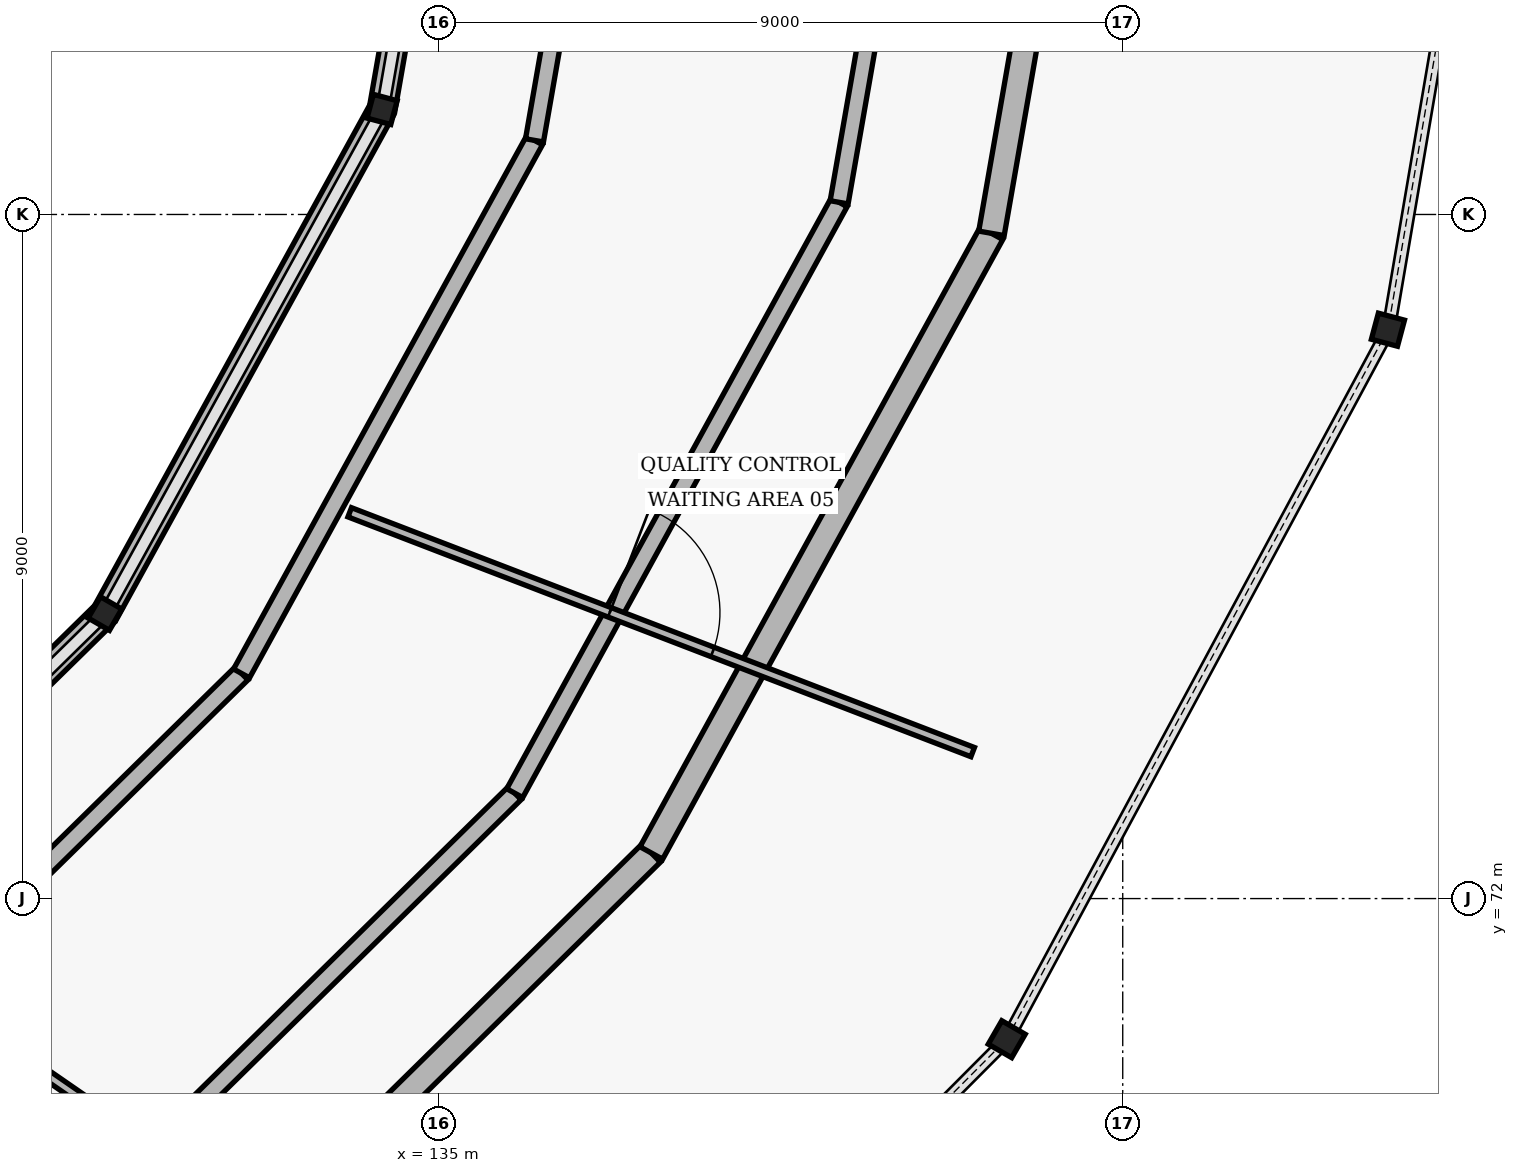
"""IFC4 building model, lengths in metres.
Left out: names, types, materials, properties, quantities, classifications, styles, units other than length and angle.
Written with IfcOpenShell. Run it as: python <this file> out.ifc"""

import sys

from ifc_helpers import new_model, si_unit, direction, frame, frame_2d, origin, origin_2d, place, context, subcontext, project, spatial, rectangle, hollow_circle, extrude, element, fill, save


model = new_model("IFC4")
c1 = context("Model", 3, precision=1e-05, world=origin(), true_north=direction((0.0, 1.0)))
c2 = subcontext(c1, "Body", "Model", "MODEL_VIEW")
j1 = project(units=[si_unit("LENGTHUNIT", "METRE"), si_unit("PLANEANGLEUNIT", "RADIAN")], contexts=[c1])
p1 = place(None, origin())
s1 = spatial("IfcSite", under=j1, at=p1, CompositionType="ELEMENT")
p2 = place(p1, origin())
s2 = spatial("IfcBuilding", under=s1, at=p2, CompositionType="ELEMENT")
p3 = place(p2, frame((0.0, 0.0, 9.6)))
s3 = spatial("IfcBuildingStorey", under=s2, at=p3, CompositionType="ELEMENT", Elevation=9.6)
p4 = place(p3, frame((130.61, 75.75, 0.0), z_axis=(0.0, 0.0, 1.0), x_axis=(0.866025403784, -0.5, 0.0)))
e1 = element("IfcColumn", 1, at=p4, inside=s3, PredefinedType="COLUMN", context=c2, shape_type="SweptSolid", body=[
    extrude(hollow_circle(Radius=0.162, WallThickness=0.016, at=origin_2d()), origin(), (0.0, 0.0, 1.0), 4.38),
])
p5 = place(p3, frame((142.474, 70.15, 0.0), z_axis=(0.0, 0.0, 1.0), x_axis=(0.866025403784, -0.5, 0.0)))
e2 = element("IfcColumn", 2, at=p5, inside=s3, PredefinedType="COLUMN", context=c2, shape_type="SweptSolid", body=[
    extrude(hollow_circle(Radius=0.178, WallThickness=0.016, at=origin_2d()), origin(), (0.0, 0.0, 1.0), 3.38),
])
p6 = place(p3, frame((134.256, 82.382, 0.0), z_axis=(0.0, 0.0, 1.0), x_axis=(0.965925826289, -0.258819045103, 0.0)))
e3 = element("IfcColumn", 3, at=p6, inside=s3, PredefinedType="COLUMN", context=c2, shape_type="SweptSolid", body=[
    extrude(hollow_circle(Radius=0.162, WallThickness=0.016, at=origin_2d()), origin(), (0.0, 0.0, 1.0), 4.38),
])
p7 = place(p3, frame((147.489, 79.484, 0.0), z_axis=(0.0, 0.0, 1.0), x_axis=(0.965925826289, -0.258819045103, 0.0)))
e4 = element("IfcColumn", 4, at=p7, inside=s3, PredefinedType="COLUMN", context=c2, shape_type="SweptSolid", body=[
    extrude(hollow_circle(Radius=0.178, WallThickness=0.016, at=origin_2d()), origin(), (0.0, 0.0, 1.0), 3.38),
])
p8 = place(p3, frame((130.678, 65.6, 4.53), z_axis=(0.0, 0.0, 1.0), x_axis=(0.713096204455, 0.701066190307, 0.0)))
e5 = element("IfcWall", 5, at=p8, inside=s3, PredefinedType="SOLIDWALL", context=c2, shape_type="SweptSolid", body=[
    extrude(rectangle(XDim=9.985, YDim=0.34, at=frame_2d((4.992, 0.0))), origin(), (0.0, 0.0, 1.0), 3.02),
])
p9 = place(p3, frame((124.809, 70.055, 4.39), z_axis=(0.0, 0.0, 1.0), x_axis=(0.713593723838, 0.700559774251, 0.0)))
e6 = element("IfcWall", 6, at=p9, inside=s3, PredefinedType="SOLIDWALL", context=c2, shape_type="SweptSolid", body=[
    extrude(rectangle(XDim=8.129, YDim=0.34, at=frame_2d((4.065, 0.0))), origin(), (0.0, 0.0, 1.0), 3.16),
])
p10 = place(p3, frame((129.211, 66.713, 7.58), z_axis=(0.0, 0.0, 1.0), x_axis=(0.713170660677, 0.700990448401, 0.0)))
e7 = element("IfcWall", 7, at=p10, inside=s3, PredefinedType="SOLIDWALL", context=c2, shape_type="SweptSolid", body=[
    extrude(rectangle(XDim=9.521, YDim=0.24, at=frame_2d((4.76, 0.0))), origin(), (0.0, 0.0, 1.0), 2.37),
])
p11 = place(p3, frame((126.277, 68.941, 7.58), z_axis=(0.0, 0.0, 1.0), x_axis=(0.713414677491, 0.700742105157, 0.0)))
e8 = element("IfcWall", 8, at=p11, inside=s3, PredefinedType="SOLIDWALL", context=c2, shape_type="SweptSolid", body=[
    extrude(rectangle(XDim=8.592, YDim=0.24, at=frame_2d((4.296, 0.0))), origin(), (0.0, 0.0, 1.0), 2.37),
])
p12 = place(p3, frame((137.798, 72.6, 4.53), z_axis=(0.0, 0.0, 1.0), x_axis=(0.481203038707, 0.876609169208, 0.0)))
e9 = element("IfcWall", 9, at=p12, inside=s3, PredefinedType="SOLIDWALL", context=c2, shape_type="SweptSolid", body=[
    extrude(rectangle(XDim=9.299, YDim=0.34, at=frame_2d((4.65, 0.0))), origin(), (0.0, 0.0, 1.0), 3.02),
])
p13 = place(p3, frame((130.61, 75.75, 4.39), z_axis=(0.0, 0.0, 1.0), x_axis=(0.481751565348, 0.876307839338, 0.0)))
e10 = element("IfcWall", 10, at=p13, inside=s3, PredefinedType="SOLIDWALL", context=c2, shape_type="SweptSolid", body=[
    extrude(rectangle(XDim=7.568, YDim=0.34, at=frame_2d((3.784, 0.0))), origin(), (0.0, 0.0, 1.0), 3.16),
])
p14 = place(p3, frame((136.001, 73.387, 7.58), z_axis=(0.0, 0.0, 1.0), x_axis=(0.48130775835, 0.876551676601, 0.0)))
e11 = element("IfcWall", 11, at=p14, inside=s3, PredefinedType="SOLIDWALL", context=c2, shape_type="SweptSolid", body=[
    extrude(rectangle(XDim=8.868, YDim=0.24, at=frame_2d((4.434, 0.0))), origin(), (0.0, 0.0, 1.0), 2.37),
])
p15 = place(p3, frame((132.407, 74.962, 7.58), z_axis=(0.0, 0.0, 1.0), x_axis=(0.481607192972, 0.876387192785, 0.0)))
e12 = element("IfcWall", 12, at=p15, inside=s3, PredefinedType="SOLIDWALL", context=c2, shape_type="SweptSolid", body=[
    extrude(rectangle(XDim=8.002, YDim=0.24, at=frame_2d((4.001, 0.0))), origin(), (0.0, 0.0, 1.0), 2.37),
])
p16 = place(p3, frame((142.273, 80.752, 4.53), z_axis=(0.0, 0.0, 1.0), x_axis=(0.171964181022, 0.985103202941, 0.0)))
e13 = element("IfcWall", 13, at=p16, inside=s3, PredefinedType="SOLIDWALL", context=c2, shape_type="SweptSolid", body=[
    extrude(rectangle(XDim=8.88, YDim=0.34, at=frame_2d((4.44, 0.0))), origin(), (0.0, 0.0, 1.0), 3.02),
])
p17 = place(p3, frame((134.256, 82.382, 4.39), z_axis=(0.0, 0.0, 1.0), x_axis=(0.172146745201, 0.985071316259, 0.0)))
e14 = element("IfcWall", 14, at=p17, inside=s3, PredefinedType="SOLIDWALL", context=c2, shape_type="SweptSolid", body=[
    extrude(rectangle(XDim=7.226, YDim=0.34, at=frame_2d((3.613, 0.0))), origin(), (0.0, 0.0, 1.0), 3.16),
])
p18 = place(p3, frame((140.269, 81.16, 7.58), z_axis=(0.0, 0.0, 1.0), x_axis=(0.171983700119, 0.985099795398, 0.0)))
e15 = element("IfcWall", 15, at=p18, inside=s3, PredefinedType="SOLIDWALL", context=c2, shape_type="SweptSolid", body=[
    extrude(rectangle(XDim=8.466, YDim=0.24, at=frame_2d((4.233, 0.0))), origin(), (0.0, 0.0, 1.0), 2.37),
])
p19 = place(p3, frame((136.261, 81.975, 7.58), z_axis=(0.0, 0.0, 1.0), x_axis=(0.172012838792, 0.985094707777, 0.0)))
e16 = element("IfcWall", 16, at=p19, inside=s3, PredefinedType="SOLIDWALL", context=c2, shape_type="SweptSolid", body=[
    extrude(rectangle(XDim=7.639, YDim=0.24, at=frame_2d((3.819, 0.0))), origin(), (0.0, 0.0, 1.0), 2.37),
])
p20 = place(p3, frame((128.475, 70.626, 0.0), z_axis=(0.0, 0.0, 1.0), x_axis=(0.822666462931, -0.568524309743, 0.0)))
e17 = element("IfcWall", 17, at=p20, inside=s3, PredefinedType="PARTITIONING", context=c2, shape_type="SweptSolid", body=[
    extrude(rectangle(XDim=8.223, YDim=0.13, at=frame_2d((4.112, 0.0))), origin(), (0.0, 0.0, 1.0), 2.9),
])
p21 = place(p20, frame((3.387, 0.0, 0.0)))
e18 = element("IfcOpeningElement", 18, at=p21, cuts=e17, PredefinedType="OPENING", context=c2, shape_type="SweptSolid", body=[
    extrude(rectangle(XDim=1.45, YDim=2.15, at=frame_2d((0.725, 1.075))), frame((0.0, 0.075, 0.0), z_axis=(0.0, -1.0, 0.0), x_axis=(1.0, 0.0, 0.0)), (0.0, 0.0, 1.0), 0.15),
])
p22 = place(p3, frame((133.83, 77.082, 0.0), z_axis=(0.0, 0.0, 1.0), x_axis=(0.933238808021, -0.359256631399, 0.0)))
e19 = element("IfcWall", 19, at=p22, inside=s3, PredefinedType="PARTITIONING", context=c2, shape_type="SweptSolid", body=[
    extrude(rectangle(XDim=8.782, YDim=0.13, at=frame_2d((4.391, 0.0))), origin(), (0.0, 0.0, 1.0), 2.9),
])
p23 = place(p22, frame((3.666, 0.0, 0.0)))
e20 = element("IfcOpeningElement", 20, at=p23, cuts=e19, PredefinedType="OPENING", context=c2, shape_type="SweptSolid", body=[
    extrude(rectangle(XDim=1.45, YDim=2.15, at=frame_2d((0.725, 1.075))), frame((0.0, 0.075, 0.0), z_axis=(0.0, -1.0, 0.0), x_axis=(1.0, 0.0, 0.0)), (0.0, 0.0, 1.0), 0.15),
])
p24 = place(p23, origin())
e21 = element("IfcDoor", 21, at=p24, inside=s3, OperationType="SINGLE_SWING_LEFT", PredefinedType="DOOR", context=c2, shape_type="SweptSolid", body=[
    extrude(rectangle(XDim=1.45, YDim=2.15, at=frame_2d((0.725, 1.075))), frame((0.0, 0.025, 0.0), z_axis=(0.0, -1.0, 0.0), x_axis=(1.0, 0.0, 0.0)), (0.0, 0.0, 1.0), 0.05),
])
fill(e20, e21)
save(model, sys.argv[1])
